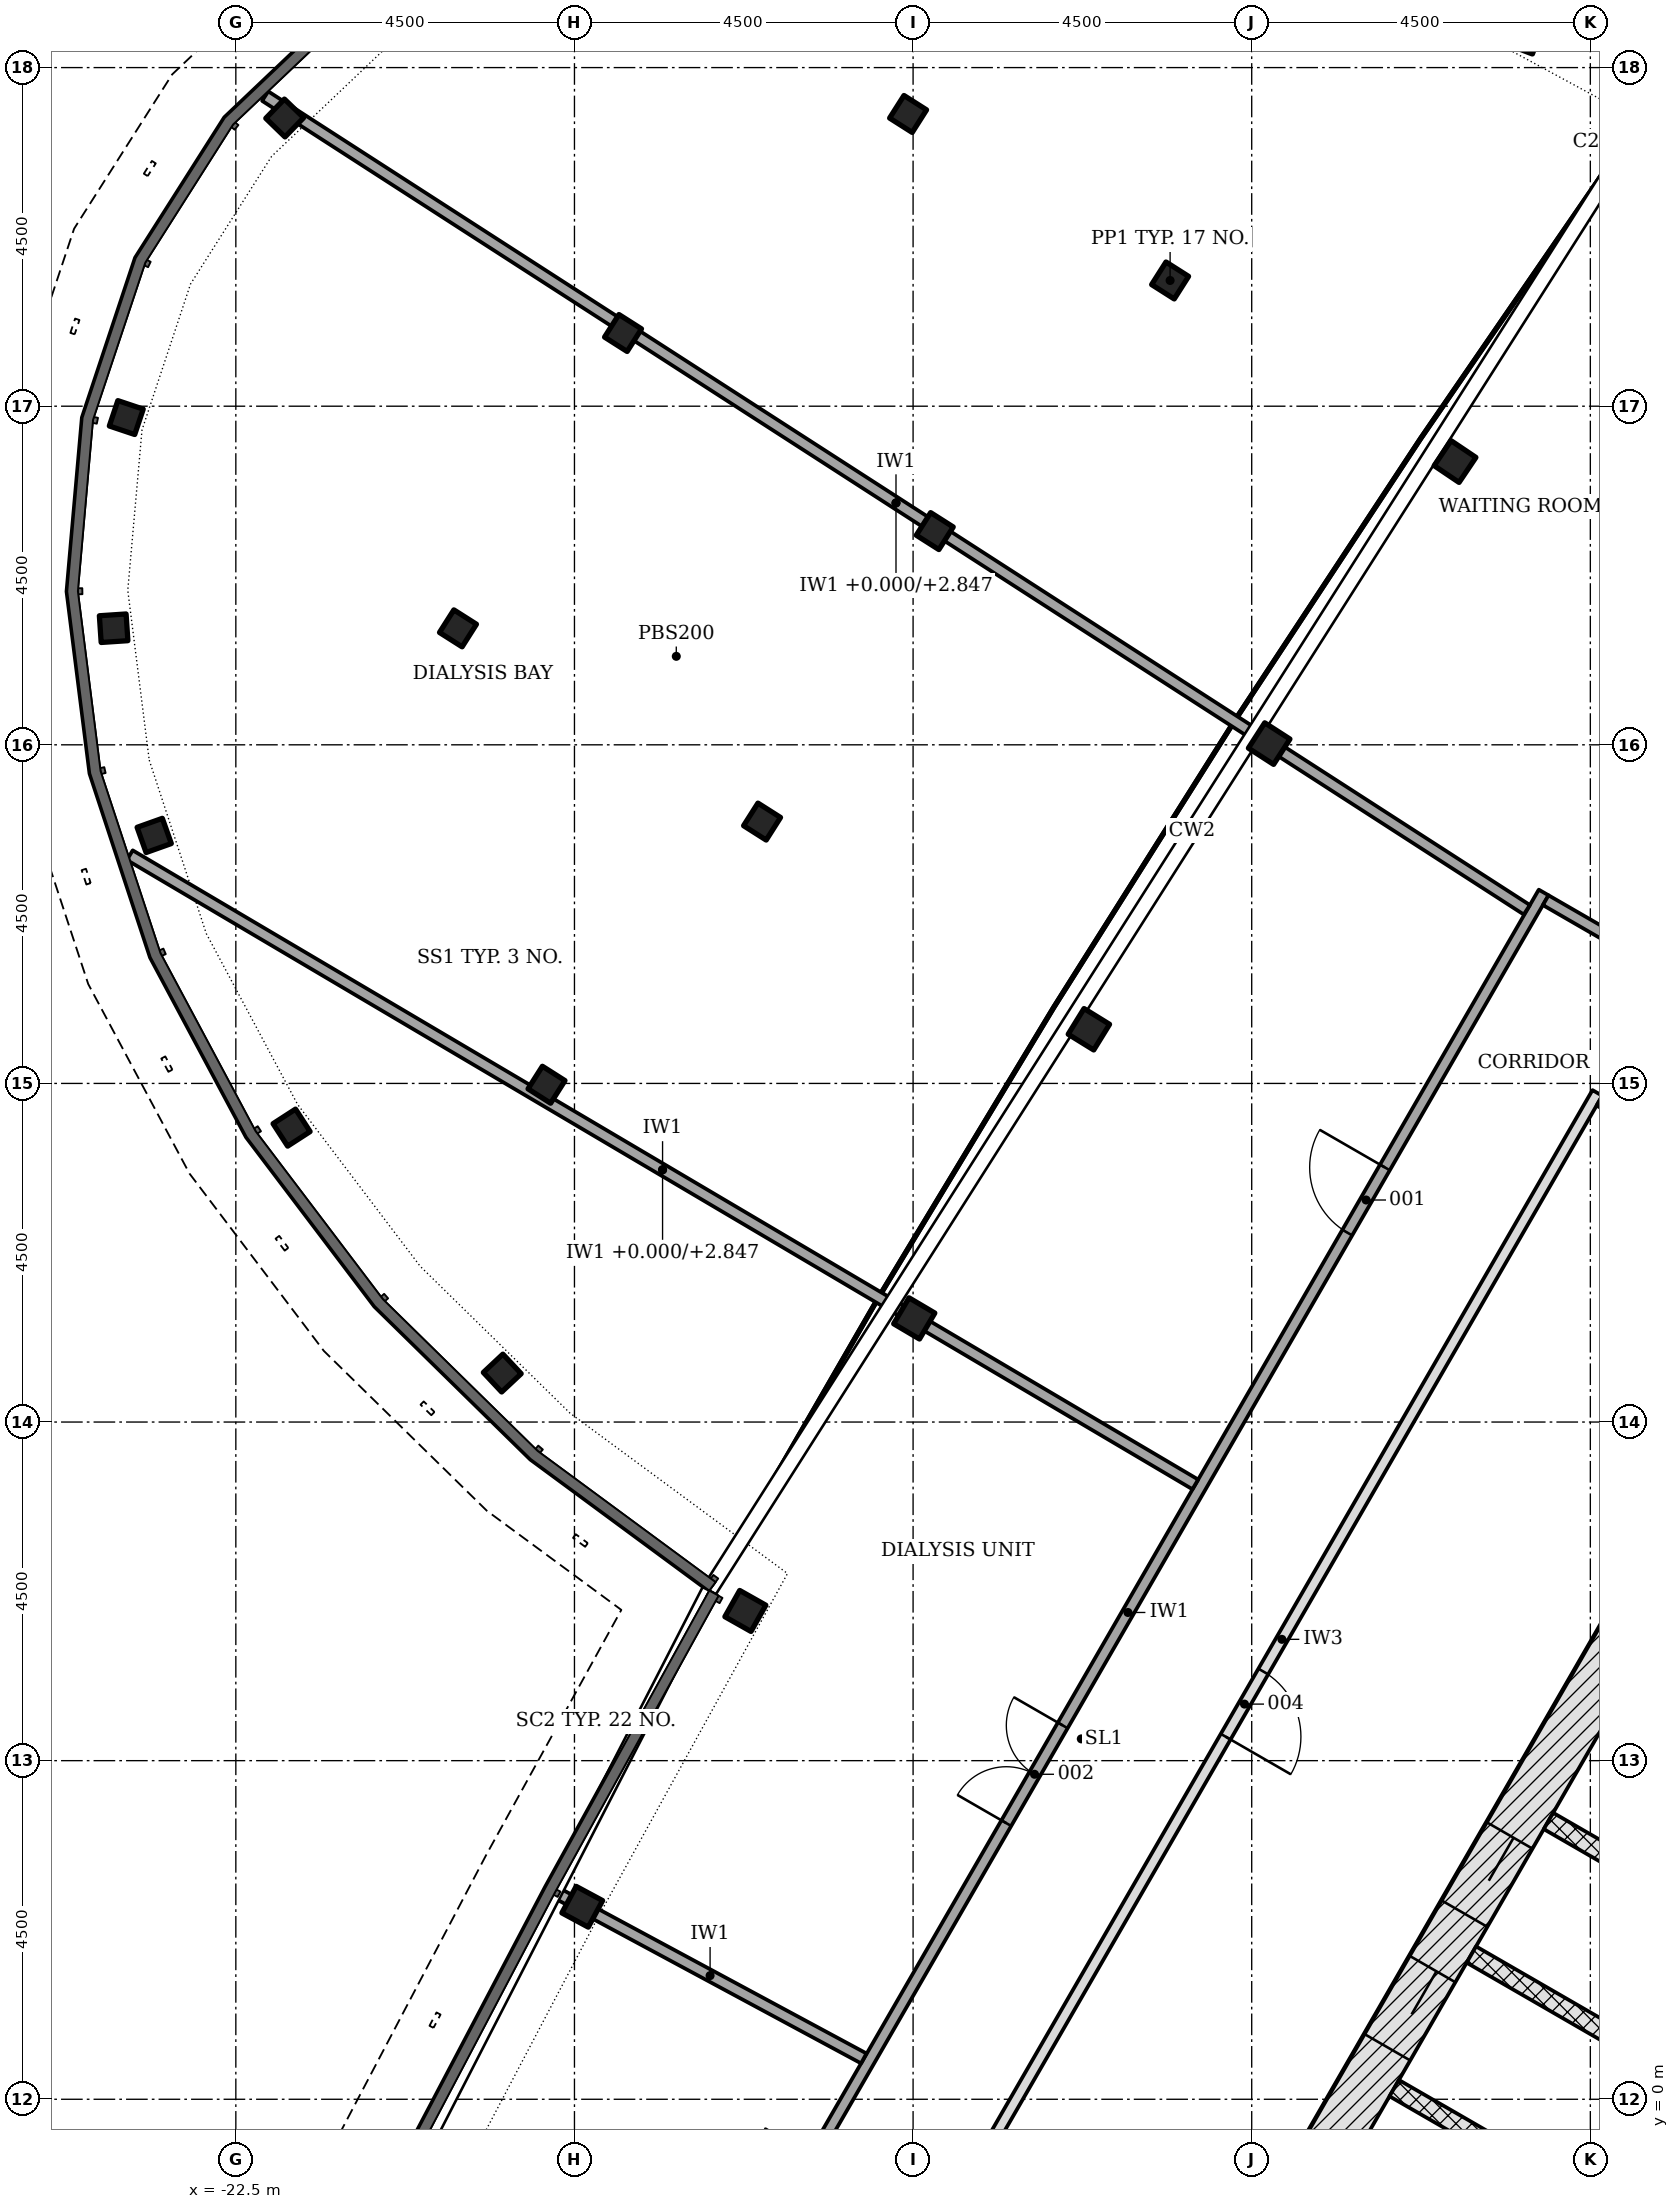
"""IFC4 building model, lengths in metres.
Left out: names, types, materials, properties, quantities, classifications, styles, units other than length and angle.
Written with IfcOpenShell. Run it as: python <this file> out.ifc"""

import sys

from ifc_helpers import new_model, si_unit, direction, frame, frame_2d, origin, origin_2d, place, context, subcontext, project, spatial, rectangle, hollow_rectangle, i_section, extrude, element, fill, save


model = new_model("IFC4")
c1 = context("Model", 3, precision=1e-05, world=origin(), true_north=direction((0.0, 1.0)))
c2 = subcontext(c1, "Body", "Model", "MODEL_VIEW")
j1 = project(units=[si_unit("LENGTHUNIT", "METRE"), si_unit("PLANEANGLEUNIT", "RADIAN")], contexts=[c1])
p1 = place(None, origin())
s1 = spatial("IfcSite", under=j1, at=p1, CompositionType="ELEMENT")
p2 = place(p1, origin())
s2 = spatial("IfcBuilding", under=s1, at=p2, CompositionType="ELEMENT")
p3 = place(p2, frame((0.0, 0.0, 98.7)))
s3 = spatial("IfcBuildingStorey", under=s2, at=p3, CompositionType="ELEMENT", Elevation=98.7)
p4 = place(p3, frame((-1.083, 11.281, -0.2), z_axis=(0.0, 0.0, 1.0), x_axis=(-0.500001446645, -0.866024568562, 0.0)))
e1 = element("IfcWall", 1, at=p4, inside=s3, PredefinedType="SHEAR", context=c2, shape_type="SweptSolid", body=[
    extrude(rectangle(XDim=18.458, YDim=0.7, at=frame_2d((9.229, 0.0))), origin(), (0.0, 0.0, 1.0), 3.6),
])
p5 = place(p4, frame((8.979, 0.0, 0.2)))
e2 = element("IfcOpeningElement", 2, at=p5, cuts=e1, PredefinedType="OPENING", context=c2, shape_type="SweptSolid", body=[
    extrude(rectangle(XDim=1.2, YDim=2.1, at=frame_2d((0.6, 1.05))), frame((0.0, 0.36, 0.0), z_axis=(0.0, -1.0, 0.0), x_axis=(1.0, 0.0, 0.0)), (0.0, 0.0, 1.0), 0.72),
])
p6 = place(p4, frame((11.029, 0.0, 0.2)))
e3 = element("IfcOpeningElement", 3, at=p6, cuts=e1, PredefinedType="OPENING", context=c2, shape_type="SweptSolid", body=[
    extrude(rectangle(XDim=1.2, YDim=2.1, at=frame_2d((0.6, 1.05))), frame((0.0, 0.36, 0.0), z_axis=(0.0, -1.0, 0.0), x_axis=(1.0, 0.0, 0.0)), (0.0, 0.0, 1.0), 0.72),
])
for number, where, z_axis, x_axis in (
    (4, (-6.298, 21.765, -0.2), (0.0, 0.0, 1.0), (-0.558, -0.83, 0.0)),
    (5, (-8.768, 18.016, -0.2), (0.0, 0.0, 1.0), (-0.542, -0.84, 0.0)),
    (6, (-11.164, 14.22, -0.2), (0.0, 0.0, 1.0), (-0.525, -0.851, 0.0)),
    (7, (-13.484, 10.377, -0.2), (0.0, 0.0, 1.0), (-0.508, -0.861, 0.0)),
    (8, (-15.729, 6.49, -0.2), (0.0, 0.0, 1.0), (-0.491, -0.871, 0.0)),
    (9, (-17.897, 2.558, -0.2), (0.0, 0.0, 1.0), (-0.474, -0.88, 0.0)),
):
    element("IfcColumn", number, at=place(p3, frame(where, z_axis=z_axis, x_axis=x_axis)), inside=s3, PredefinedType="COLUMN", context=c2, shape_type="SweptSolid", body=[
        extrude(i_section(OverallWidth=0.401, OverallDepth=0.399, WebThickness=0.025, FlangeThickness=0.04, FilletRadius=0.015, at=origin_2d()), origin(), (0.0, 0.0, 1.0), 3.6),
    ])
for number, where, z_axis, x_axis in (
    (10, (-10.084, 24.171, -0.2), (0.0, 0.0, 1.0), (-0.844, 0.536, 0.0)),
    (11, (-13.566, 26.384, -0.2), (0.0, 0.0, 1.0), (-0.844, 0.536, 0.0)),
    (12, (-13.212, 20.84, -0.2), (0.0, 0.0, 1.0), (-0.844, 0.536, 0.0)),
    (13, (-17.354, 23.473, -0.2), (0.0, 0.0, 1.0), (-0.844, 0.536, 0.0)),
    (14, (-15.507, 16.98, -0.2), (0.0, 0.0, 1.0), (-0.844, 0.536, 0.0)),
    (15, (-19.548, 19.548, -0.2), (0.0, 0.0, 1.0), (-0.844, 0.536, 0.0)),
    (16, (-18.372, 13.483, -0.2), (0.0, 0.0, 1.0), (-0.844, 0.536, 0.0)),
    (17, (-5.373, 27.41, -0.2), (0.0, 0.0, 1.0), (-0.935, 0.355, 0.0)),
    (18, (-21.851, 26.33, -0.2), (0.0, 0.0, 1.0), (-0.696, -0.718, 0.0)),
    (19, (-23.956, 22.349, -0.2), (0.0, 0.0, 1.0), (-0.318, -0.948, 0.0)),
    (20, (-24.124, 19.55, -0.2), (0.0, 0.0, 1.0), (0.067, -0.998, 0.0)),
    (21, (-23.585, 16.796, -0.2), (0.0, 0.0, 1.0), (0.336, -0.942, 0.0)),
    (22, (-21.759, 12.913, -0.2), (0.0, 0.0, 1.0), (0.543, -0.839, 0.0)),
    (23, (-18.959, 9.651, -0.2), (0.0, 0.0, 1.0), (0.684, -0.73, 0.0)),
):
    element("IfcColumn", number, at=place(p3, frame(where, z_axis=z_axis, x_axis=x_axis)), inside=s3, PredefinedType="COLUMN", context=c2, shape_type="SweptSolid", body=[
        extrude(hollow_rectangle(XDim=0.356, YDim=0.356, WallThickness=0.013, at=origin_2d()), origin(), (0.0, 0.0, 1.0), 3.6),
    ])
for number, where, z_axis, x_axis in (
    (24, (-5.056, 3.699, -0.2), (0.0, 0.0, 1.0), (0.866, -0.5, 0.0)),
    (25, (-6.081, 1.923, -0.2), (0.0, 0.0, 1.0), (0.866, -0.5, 0.0)),
    (26, (-7.106, 0.148, -0.2), (0.0, 0.0, 1.0), (0.866, -0.5, 0.0)),
):
    element("IfcWall", number, at=place(p3, frame(where, z_axis=z_axis, x_axis=x_axis)), inside=s3, PredefinedType="PARTITIONING", context=c2, shape_type="SweptSolid", body=[
        extrude(rectangle(XDim=2.9, YDim=0.25, at=frame_2d((1.45, 0.0))), origin(), (0.0, 0.0, 1.0), 3.6),
    ])
p7 = place(p3, frame((0.176, 6.711, 0.0), z_axis=(0.0, 0.0, 1.0), x_axis=(-0.500004227369, -0.866022963098, 0.0)))
e27 = element("IfcWall", 27, at=p7, inside=s3, PredefinedType="PARTITIONING", context=c2, shape_type="SweptSolid", body=[
    extrude(rectangle(XDim=11.8, YDim=0.25, at=frame_2d((5.9, 0.0))), origin(), (0.0, 0.0, 1.0), 3.4),
])
p8 = place(p3, frame((-16.169, -3.099, 0.0), z_axis=(0.0, 0.0, 1.0), x_axis=(0.499999805269, 0.866025516212, 0.0)))
e28 = element("IfcWall", 28, at=p8, inside=s3, PredefinedType="PARTITIONING", context=c2, shape_type="SweptSolid", body=[
    extrude(rectangle(XDim=22.097, YDim=0.15, at=frame_2d((11.049, 0.0))), origin(), (0.0, 0.0, 1.0), 2.778),
])
p9 = place(p8, frame((16.878, 0.0, 0.0)))
e29 = element("IfcOpeningElement", 29, at=p9, cuts=e28, PredefinedType="OPENING", context=c2, shape_type="SweptSolid", body=[
    extrude(rectangle(XDim=1.0, YDim=2.1, at=frame_2d((0.5, 1.05))), frame((0.0, 0.085, 0.0), z_axis=(0.0, -1.0, 0.0), x_axis=(1.0, 0.0, 0.0)), (0.0, 0.0, 1.0), 0.17),
])
p10 = place(p8, frame((7.816, 0.0, 0.0)))
e30 = element("IfcOpeningElement", 30, at=p10, cuts=e28, PredefinedType="OPENING", context=c2, shape_type="SweptSolid", body=[
    extrude(rectangle(XDim=1.5, YDim=2.1, at=frame_2d((0.75, 1.05))), frame((0.0, 0.085, 0.0), z_axis=(0.0, -1.0, 0.0), x_axis=(1.0, 0.0, 0.0)), (0.0, 0.0, 1.0), 0.17),
])
p11 = place(p8, frame((1.2, 0.0, 0.0)))
e31 = element("IfcOpeningElement", 31, at=p11, cuts=e28, PredefinedType="OPENING", context=c2, shape_type="SweptSolid", body=[
    extrude(rectangle(XDim=1.5, YDim=2.1, at=frame_2d((0.75, 1.05))), frame((0.0, 0.085, 0.0), z_axis=(0.0, -1.0, 0.0), x_axis=(1.0, 0.0, 0.0)), (0.0, 0.0, 1.0), 0.17),
])
p12 = place(p3, frame((-4.407, 13.374, 0.0), z_axis=(0.0, 0.0, 1.0), x_axis=(-0.499997181693, -0.866027030928, 0.0)))
e32 = element("IfcWall", 32, at=p12, inside=s3, PredefinedType="PARTITIONING", context=c2, shape_type="SweptSolid", body=[
    extrude(rectangle(XDim=16.77, YDim=0.15, at=frame_2d((8.385, 0.0))), origin(), (0.0, 0.0, 1.0), 2.778),
])
p13 = place(p12, frame((8.879, 0.0, 0.0)))
e33 = element("IfcOpeningElement", 33, at=p13, cuts=e32, PredefinedType="OPENING", context=c2, shape_type="SweptSolid", body=[
    extrude(rectangle(XDim=1.0, YDim=2.1, at=frame_2d((0.5, 1.05))), frame((0.0, 0.085, 0.0), z_axis=(0.0, -1.0, 0.0), x_axis=(1.0, 0.0, 0.0)), (0.0, 0.0, 1.0), 0.17),
])
p14 = place(p3, frame((-5.093, 15.935, 0.0), z_axis=(0.0, 0.0, 1.0), x_axis=(0.866033195618, -0.499986503906, 0.0)))
e34 = element("IfcWall", 34, at=p14, inside=s3, PredefinedType="PARTITIONING", context=c2, shape_type="SweptSolid", body=[
    extrude(rectangle(XDim=5.282, YDim=0.15, at=frame_2d((2.641, 0.0))), origin(), (0.0, 0.0, 1.0), 3.4),
])
p15 = place(p14, frame((1.816, 0.0, 0.0)))
e35 = element("IfcOpeningElement", 35, at=p15, cuts=e34, PredefinedType="OPENING", context=c2, shape_type="SweptSolid", body=[
    extrude(rectangle(XDim=1.5, YDim=2.1, at=frame_2d((0.75, 1.05))), frame((0.0, 0.085, 0.0), z_axis=(0.0, -1.0, 0.0), x_axis=(1.0, 0.0, 0.0)), (0.0, 0.0, 1.0), 0.17),
])
p16 = place(p3, frame((-4.379, 13.271, 0.0), z_axis=(0.0, 0.0, 1.0), x_axis=(0.866019471182, -0.500010275428, 0.0)))
e36 = element("IfcWall", 36, at=p16, inside=s3, PredefinedType="PARTITIONING", context=c2, shape_type="SweptSolid", body=[
    extrude(rectangle(XDim=3.5, YDim=0.15, at=frame_2d((1.75, 0.0))), origin(), (0.0, 0.0, 1.0), 3.4),
])
p17 = place(p3, frame((-22.11, 26.621, 0.0), z_axis=(0.0, 0.0, 1.0), x_axis=(0.840382773847, -0.541993351823, 0.0)))
e37 = element("IfcWall", 37, at=p17, inside=s3, PredefinedType="PARTITIONING", context=c2, shape_type="SweptSolid", body=[
    extrude(rectangle(XDim=19.951, YDim=0.15, at=frame_2d((9.976, 0.0))), origin(), (0.0, 0.0, 1.0), 2.778),
])
p18 = place(p3, frame((-23.909, 16.533, 0.0), z_axis=(0.0, 0.0, 1.0), x_axis=(0.86106275482, -0.508498704288, 0.0)))
e38 = element("IfcWall", 38, at=p18, inside=s3, PredefinedType="PARTITIONING", context=c2, shape_type="SweptSolid", body=[
    extrude(rectangle(XDim=16.444, YDim=0.15, at=frame_2d((8.222, 0.0))), origin(), (0.0, 0.0, 1.0), 2.778),
])
p19 = place(p3, frame((-18.24, 2.743, 0.0), z_axis=(0.0, 0.0, 1.0), x_axis=(0.88042716359, -0.474181410024, 0.0)))
e39 = element("IfcWall", 39, at=p19, inside=s3, PredefinedType="PARTITIONING", context=c2, shape_type="SweptSolid", body=[
    extrude(rectangle(XDim=4.639, YDim=0.15, at=frame_2d((2.32, 0.0))), origin(), (0.0, 0.0, 1.0), 2.778),
])
p20 = place(p5, origin())
e40 = element("IfcDoor", 40, at=p20, inside=s3, OperationType="DOUBLE_DOOR_SLIDING", PredefinedType="DOOR", context=c2, shape_type="SweptSolid", body=[
    extrude(rectangle(XDim=1.2, YDim=2.1, at=frame_2d((0.6, 1.05))), frame((0.0, 0.025, 0.0), z_axis=(0.0, -1.0, 0.0), x_axis=(1.0, 0.0, 0.0)), (0.0, 0.0, 1.0), 0.05),
])
fill(e2, e40)
p21 = place(p6, origin())
e41 = element("IfcDoor", 41, at=p21, inside=s3, OperationType="DOUBLE_DOOR_SLIDING", PredefinedType="DOOR", context=c2, shape_type="SweptSolid", body=[
    extrude(rectangle(XDim=1.2, YDim=2.1, at=frame_2d((0.6, 1.05))), frame((0.0, 0.025, 0.0), z_axis=(0.0, -1.0, 0.0), x_axis=(1.0, 0.0, 0.0)), (0.0, 0.0, 1.0), 0.05),
])
fill(e3, e41)
p22 = place(p9, origin())
e42 = element("IfcDoor", 42, at=p22, inside=s3, OperationType="SINGLE_SWING_RIGHT", PredefinedType="DOOR", context=c2, shape_type="SweptSolid", body=[
    extrude(rectangle(XDim=1.0, YDim=2.1, at=frame_2d((0.5, 1.05))), frame((0.0, 0.025, 0.0), z_axis=(0.0, -1.0, 0.0), x_axis=(1.0, 0.0, 0.0)), (0.0, 0.0, 1.0), 0.05),
])
fill(e29, e42)
p23 = place(p10, origin())
e43 = element("IfcDoor", 43, at=p23, inside=s3, OperationType="DOUBLE_DOOR_SINGLE_SWING", PredefinedType="DOOR", context=c2, shape_type="SweptSolid", body=[
    extrude(rectangle(XDim=1.5, YDim=2.1, at=frame_2d((0.75, 1.05))), frame((0.0, 0.025, 0.0), z_axis=(0.0, -1.0, 0.0), x_axis=(1.0, 0.0, 0.0)), (0.0, 0.0, 1.0), 0.05),
])
fill(e30, e43)
p24 = place(p13, origin())
e44 = element("IfcDoor", 44, at=p24, inside=s3, OperationType="SINGLE_SWING_RIGHT", PredefinedType="DOOR", context=c2, shape_type="SweptSolid", body=[
    extrude(rectangle(XDim=1.0, YDim=2.1, at=frame_2d((0.5, 1.05))), frame((0.0, 0.025, 0.0), z_axis=(0.0, -1.0, 0.0), x_axis=(1.0, 0.0, 0.0)), (0.0, 0.0, 1.0), 0.05),
])
fill(e33, e44)
save(model, sys.argv[1])
